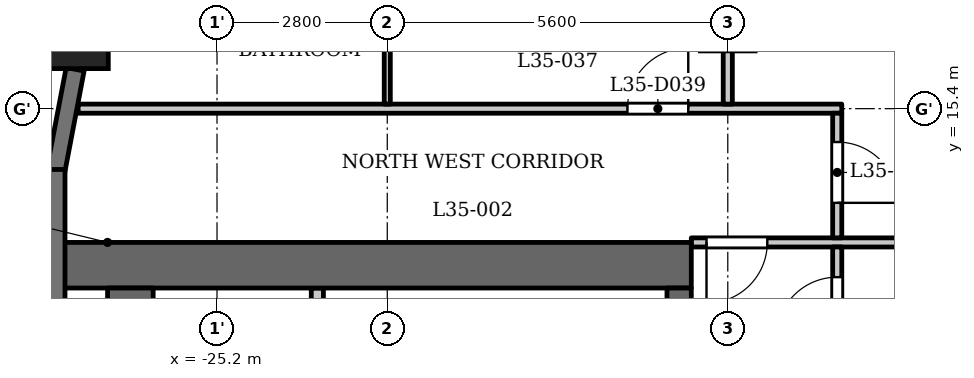
"""IFC4 building model, lengths in metres.
Left out: names, types, materials, properties, quantities, classifications, styles, units other than length and angle.
Written with IfcOpenShell. Run it as: python <this file> out.ifc"""

import sys

from ifc_helpers import new_model, si_unit, direction, frame, frame_2d, origin, origin_2d, place, context, subcontext, project, spatial, rectangle, extrude, element, fill, save


model = new_model("IFC4")
c1 = context("Model", 3, precision=1e-05, world=origin(), true_north=direction((0.0, 1.0)))
c2 = subcontext(c1, "Body", "Model", "MODEL_VIEW")
j1 = project(units=[si_unit("LENGTHUNIT", "METRE"), si_unit("PLANEANGLEUNIT", "RADIAN")], contexts=[c1])
p1 = place(None, origin())
s1 = spatial("IfcSite", under=j1, at=p1, CompositionType="ELEMENT")
p2 = place(p1, origin())
s2 = spatial("IfcBuilding", under=s1, at=p2, CompositionType="ELEMENT")
p3 = place(p2, frame((0.0, 0.0, 139.6)))
s3 = spatial("IfcBuildingStorey", under=s2, at=p3, CompositionType="ELEMENT", Elevation=139.6)
p4 = place(p3, frame((-27.538, 16.609, 0.0), z_axis=(0.0, 0.0, 1.0), x_axis=(1.0, 0.0, 0.0)))
e1 = element("IfcColumn", 1, at=p4, inside=s3, PredefinedType="COLUMN", context=c2, shape_type="SweptSolid", body=[
    extrude(rectangle(XDim=1.1, YDim=1.1, at=origin_2d()), origin(), (0.0, 0.0, 1.0), 3.5),
])
p5 = place(p3, frame((-27.533, 16.048, 0.0), z_axis=(0.0, 0.0, 1.0), x_axis=(-0.187302784601, -0.982302227871, 0.0)))
e2 = element("IfcWall", 2, at=p5, inside=s3, PredefinedType="SOLIDWALL", context=c2, shape_type="SweptSolid", body=[
    extrude(rectangle(XDim=1.706, YDim=0.3, at=frame_2d((0.853, 0.0))), origin(), (0.0, 0.0, 1.0), 2.45),
])
p6 = place(p3, frame((-27.85, 14.4, 0.0), z_axis=(0.0, 0.0, 1.0), x_axis=(0.0, -1.0, 0.0)))
e3 = element("IfcWall", 3, at=p6, inside=s3, PredefinedType="SOLIDWALL", context=c2, shape_type="SweptSolid", body=[
    extrude(rectangle(XDim=2.65, YDim=0.3, at=frame_2d((1.325, 0.0))), origin(), (0.0, 0.0, 1.0), 2.45),
])
p7 = place(p3, frame((-17.4, 12.825, 0.0), z_axis=(0.0, 0.0, 1.0), x_axis=(-1.0, 0.0, 0.0)))
e4 = element("IfcWall", 4, at=p7, inside=s3, PredefinedType="SHEAR", context=c2, shape_type="SweptSolid", body=[
    extrude(rectangle(XDim=10.4, YDim=0.75, at=frame_2d((5.2, 0.0))), origin(), (0.0, 0.0, 1.0), 3.2),
])
p8 = place(p3, frame((-17.6, -12.45, 0.0), z_axis=(0.0, 0.0, 1.0), x_axis=(0.0, 1.0, 0.0)))
e5 = element("IfcWall", 5, at=p8, inside=s3, PredefinedType="SHEAR", context=c2, shape_type="SweptSolid", body=[
    extrude(rectangle(XDim=24.9, YDim=0.4, at=frame_2d((12.45, 0.0))), origin(), (0.0, 0.0, 1.0), 3.2),
])
p9 = place(p8, frame((8.65, 0.0, 0.0)))
e6 = element("IfcOpeningElement", 6, at=p9, cuts=e5, PredefinedType="OPENING", context=c2, shape_type="SweptSolid", body=[
    extrude(rectangle(XDim=0.9, YDim=2.1, at=frame_2d((0.45, 1.05))), frame((0.0, 0.21, 0.0), z_axis=(0.0, -1.0, 0.0), x_axis=(1.0, 0.0, 0.0)), (0.0, 0.0, 1.0), 0.42),
])
p10 = place(p8, frame((15.6, 0.0, 0.0)))
e7 = element("IfcOpeningElement", 7, at=p10, cuts=e5, PredefinedType="OPENING", context=c2, shape_type="SweptSolid", body=[
    extrude(rectangle(XDim=1.1, YDim=2.1, at=frame_2d((0.55, 1.05))), frame((0.0, 0.21, 0.0), z_axis=(0.0, -1.0, 0.0), x_axis=(1.0, 0.0, 0.0)), (0.0, 0.0, 1.0), 0.42),
])
p11 = place(p8, frame((18.0, 0.0, 0.0)))
e8 = element("IfcOpeningElement", 8, at=p11, cuts=e5, PredefinedType="OPENING", context=c2, shape_type="SweptSolid", body=[
    extrude(rectangle(XDim=1.1, YDim=2.1, at=frame_2d((0.55, 1.05))), frame((0.0, 0.21, 0.0), z_axis=(0.0, -1.0, 0.0), x_axis=(1.0, 0.0, 0.0)), (0.0, 0.0, 1.0), 0.42),
])
p12 = place(p8, frame((23.025, 0.0, 0.0)))
e9 = element("IfcOpeningElement", 9, at=p12, cuts=e5, PredefinedType="OPENING", context=c2, shape_type="SweptSolid", body=[
    extrude(rectangle(XDim=1.1, YDim=2.1, at=frame_2d((0.55, 1.05))), frame((0.0, 0.21, 0.0), z_axis=(0.0, -1.0, 0.0), x_axis=(1.0, 0.0, 0.0)), (0.0, 0.0, 1.0), 0.42),
])
p13 = place(p8, frame((0.775, 0.0, 0.0)))
e10 = element("IfcOpeningElement", 10, at=p13, cuts=e5, PredefinedType="OPENING", context=c2, shape_type="SweptSolid", body=[
    extrude(rectangle(XDim=1.1, YDim=2.1, at=frame_2d((0.55, 1.05))), frame((0.0, 0.21, 0.0), z_axis=(0.0, -1.0, 0.0), x_axis=(1.0, 0.0, 0.0)), (0.0, 0.0, 1.0), 0.42),
])
p14 = place(p8, frame((12.925, 0.0, 0.0)))
e11 = element("IfcOpeningElement", 11, at=p14, cuts=e5, PredefinedType="OPENING", context=c2, shape_type="SweptSolid", body=[
    extrude(rectangle(XDim=1.8, YDim=2.1, at=frame_2d((0.9, 1.05))), frame((0.0, 0.21, 0.0), z_axis=(0.0, -1.0, 0.0), x_axis=(1.0, 0.0, 0.0)), (0.0, 0.0, 1.0), 0.42),
])
p15 = place(p3, frame((-26.625, -12.45, 0.0), z_axis=(0.0, 0.0, 1.0), x_axis=(0.0, 1.0, 0.0)))
e12 = element("IfcWall", 12, at=p15, inside=s3, PredefinedType="SHEAR", context=c2, shape_type="SweptSolid", body=[
    extrude(rectangle(XDim=24.9, YDim=0.75, at=frame_2d((12.45, 0.0))), origin(), (0.0, 0.0, 1.0), 3.2),
])
p16 = place(p3, frame((-23.55, 9.8, 0.0), z_axis=(0.0, 0.0, 1.0), x_axis=(0.0, 1.0, 0.0)))
e13 = element("IfcWall", 13, at=p16, inside=s3, PredefinedType="PARTITIONING", context=c2, shape_type="SweptSolid", body=[
    extrude(rectangle(XDim=2.65, YDim=0.2, at=frame_2d((1.325, 0.0))), origin(), (0.0, 0.0, 1.0), 3.2),
])
p17 = place(p16, frame((0.875, 0.0, 0.0)))
e14 = element("IfcOpeningElement", 14, at=p17, cuts=e13, PredefinedType="OPENING", context=c2, shape_type="SweptSolid", body=[
    extrude(rectangle(XDim=0.9, YDim=2.1, at=frame_2d((0.45, 1.05))), frame((0.0, 0.11, 0.0), z_axis=(0.0, -1.0, 0.0), x_axis=(1.0, 0.0, 0.0)), (0.0, 0.0, 1.0), 0.22),
])
p18 = place(p3, frame((-17.4, 13.2, 0.0), z_axis=(0.0, 0.0, 1.0), x_axis=(1.0, 0.0, 0.0)))
e15 = element("IfcWall", 15, at=p18, inside=s3, PredefinedType="PARTITIONING", context=c2, shape_type="SweptSolid", body=[
    extrude(rectangle(XDim=34.8, YDim=0.15, at=frame_2d((17.4, 0.0))), origin(), (0.0, 0.0, 1.0), 3.2),
])
p19 = place(p18, frame((0.25, 0.0, 0.0)))
e16 = element("IfcOpeningElement", 16, at=p19, cuts=e15, PredefinedType="OPENING", context=c2, shape_type="SweptSolid", body=[
    extrude(rectangle(XDim=1.0, YDim=2.1, at=frame_2d((0.5, 1.05))), frame((0.0, 0.085, 0.0), z_axis=(0.0, -1.0, 0.0), x_axis=(1.0, 0.0, 0.0)), (0.0, 0.0, 1.0), 0.17),
])
p20 = place(p18, frame((33.65, 0.0, 0.0)))
e17 = element("IfcOpeningElement", 17, at=p20, cuts=e15, PredefinedType="OPENING", context=c2, shape_type="SweptSolid", body=[
    extrude(rectangle(XDim=1.0, YDim=2.1, at=frame_2d((0.5, 1.05))), frame((0.0, 0.085, 0.0), z_axis=(0.0, -1.0, 0.0), x_axis=(1.0, 0.0, 0.0)), (0.0, 0.0, 1.0), 0.17),
])
p21 = place(p18, frame((15.75, 0.0, 0.0)))
e18 = element("IfcOpeningElement", 18, at=p21, cuts=e15, PredefinedType="OPENING", context=c2, shape_type="SweptSolid", body=[
    extrude(rectangle(XDim=1.0, YDim=2.1, at=frame_2d((0.5, 1.05))), frame((0.0, 0.085, 0.0), z_axis=(0.0, -1.0, 0.0), x_axis=(1.0, 0.0, 0.0)), (0.0, 0.0, 1.0), 0.17),
])
p22 = place(p18, frame((19.35, 0.0, 0.0)))
e19 = element("IfcOpeningElement", 19, at=p22, cuts=e15, PredefinedType="OPENING", context=c2, shape_type="SweptSolid", body=[
    extrude(rectangle(XDim=1.0, YDim=2.1, at=frame_2d((0.5, 1.05))), frame((0.0, 0.085, 0.0), z_axis=(0.0, -1.0, 0.0), x_axis=(1.0, 0.0, 0.0)), (0.0, 0.0, 1.0), 0.17),
])
p23 = place(p18, frame((26.95, 0.0, 0.0)))
e20 = element("IfcOpeningElement", 20, at=p23, cuts=e15, PredefinedType="OPENING", context=c2, shape_type="SweptSolid", body=[
    extrude(rectangle(XDim=1.0, YDim=2.1, at=frame_2d((0.5, 1.05))), frame((0.0, 0.085, 0.0), z_axis=(0.0, -1.0, 0.0), x_axis=(1.0, 0.0, 0.0)), (0.0, 0.0, 1.0), 0.17),
])
p24 = place(p18, frame((29.75, 0.0, 0.0)))
e21 = element("IfcOpeningElement", 21, at=p24, cuts=e15, PredefinedType="OPENING", context=c2, shape_type="SweptSolid", body=[
    extrude(rectangle(XDim=1.0, YDim=2.1, at=frame_2d((0.5, 1.05))), frame((0.0, 0.085, 0.0), z_axis=(0.0, -1.0, 0.0), x_axis=(1.0, 0.0, 0.0)), (0.0, 0.0, 1.0), 0.17),
])
p25 = place(p3, frame((-27.484, 15.4, 0.0), z_axis=(0.0, 0.0, 1.0), x_axis=(1.0, 0.0, 0.0)))
e22 = element("IfcWall", 22, at=p25, inside=s3, PredefinedType="PARTITIONING", context=c2, shape_type="SweptSolid", body=[
    extrude(rectangle(XDim=12.559, YDim=0.15, at=frame_2d((6.279, 0.0))), origin(), (0.0, 0.0, 1.0), 3.2),
])
p26 = place(p25, frame((9.034, 0.0, 0.0)))
e23 = element("IfcOpeningElement", 23, at=p26, cuts=e22, PredefinedType="OPENING", context=c2, shape_type="SweptSolid", body=[
    extrude(rectangle(XDim=1.0, YDim=2.1, at=frame_2d((0.5, 1.05))), frame((0.0, 0.085, 0.0), z_axis=(0.0, -1.0, 0.0), x_axis=(1.0, 0.0, 0.0)), (0.0, 0.0, 1.0), 0.17),
])
p27 = place(p3, frame((-22.4, 15.475, 0.0), z_axis=(0.0, 0.0, 1.0), x_axis=(0.0, 1.0, 0.0)))
e24 = element("IfcWall", 24, at=p27, inside=s3, PredefinedType="PARTITIONING", context=c2, shape_type="SweptSolid", body=[
    extrude(rectangle(XDim=2.575, YDim=0.1, at=frame_2d((1.288, 0.0))), origin(), (0.0, 0.0, 1.0), 3.2),
])
p28 = place(p3, frame((-16.8, 15.475, 0.0), z_axis=(0.0, 0.0, 1.0), x_axis=(0.0, 1.0, 0.0)))
e25 = element("IfcWall", 25, at=p28, inside=s3, PredefinedType="PARTITIONING", context=c2, shape_type="SweptSolid", body=[
    extrude(rectangle(XDim=7.455, YDim=0.15, at=frame_2d((3.728, 0.0))), origin(), (0.0, 0.0, 1.0), 3.2),
])
p29 = place(p3, frame((-15.0, 6.769, 0.0), z_axis=(0.0, 0.0, 1.0), x_axis=(0.0, 1.0, 0.0)))
e26 = element("IfcWall", 26, at=p29, inside=s3, PredefinedType="PARTITIONING", context=c2, shape_type="SweptSolid", body=[
    extrude(rectangle(XDim=6.356, YDim=0.15, at=frame_2d((3.178, 0.0))), origin(), (0.0, 0.0, 1.0), 3.2),
])
p30 = place(p29, frame((4.86, 0.0, 0.0)))
e27 = element("IfcOpeningElement", 27, at=p30, cuts=e26, PredefinedType="OPENING", context=c2, shape_type="SweptSolid", body=[
    extrude(rectangle(XDim=1.0, YDim=2.1, at=frame_2d((0.5, 1.05))), frame((0.0, 0.085, 0.0), z_axis=(0.0, -1.0, 0.0), x_axis=(1.0, 0.0, 0.0)), (0.0, 0.0, 1.0), 0.17),
])
p31 = place(p3, frame((-15.0, 13.275, 0.0), z_axis=(0.0, 0.0, 1.0), x_axis=(0.0, 1.0, 0.0)))
e28 = element("IfcWall", 28, at=p31, inside=s3, PredefinedType="PARTITIONING", context=c2, shape_type="SweptSolid", body=[
    extrude(rectangle(XDim=2.05, YDim=0.15, at=frame_2d((1.025, 0.0))), origin(), (0.0, 0.0, 1.0), 3.2),
])
p32 = place(p31, frame((0.576, 0.0, 0.0)))
e29 = element("IfcOpeningElement", 29, at=p32, cuts=e28, PredefinedType="OPENING", context=c2, shape_type="SweptSolid", body=[
    extrude(rectangle(XDim=1.0, YDim=2.1, at=frame_2d((0.5, 1.05))), frame((0.0, 0.085, 0.0), z_axis=(0.0, -1.0, 0.0), x_axis=(1.0, 0.0, 0.0)), (0.0, 0.0, 1.0), 0.17),
])
p33 = place(p30, origin())
e30 = element("IfcDoor", 30, at=p33, inside=s3, OperationType="SINGLE_SWING_RIGHT", PredefinedType="DOOR", context=c2, shape_type="SweptSolid", body=[
    extrude(rectangle(XDim=1.0, YDim=2.1, at=frame_2d((0.5, 1.05))), frame((0.0, 0.025, 0.0), z_axis=(0.0, -1.0, 0.0), x_axis=(1.0, 0.0, 0.0)), (0.0, 0.0, 1.0), 0.05),
])
fill(e27, e30)
p34 = place(p19, origin())
e31 = element("IfcDoor", 31, at=p34, inside=s3, OperationType="SINGLE_SWING_LEFT", PredefinedType="DOOR", context=c2, shape_type="SweptSolid", body=[
    extrude(rectangle(XDim=1.0, YDim=2.1, at=frame_2d((0.5, 1.05))), frame((0.0, 0.025, 0.0), z_axis=(0.0, -1.0, 0.0), x_axis=(1.0, 0.0, 0.0)), (0.0, 0.0, 1.0), 0.05),
])
fill(e16, e31)
p35 = place(p32, origin())
e32 = element("IfcDoor", 32, at=p35, inside=s3, OperationType="SINGLE_SWING_LEFT", PredefinedType="DOOR", context=c2, shape_type="SweptSolid", body=[
    extrude(rectangle(XDim=1.0, YDim=2.1, at=frame_2d((0.5, 1.05))), frame((0.0, 0.025, 0.0), z_axis=(0.0, -1.0, 0.0), x_axis=(1.0, 0.0, 0.0)), (0.0, 0.0, 1.0), 0.05),
])
fill(e29, e32)
p36 = place(p26, origin())
e33 = element("IfcDoor", 33, at=p36, inside=s3, OperationType="SINGLE_SWING_LEFT", PredefinedType="DOOR", context=c2, shape_type="SweptSolid", body=[
    extrude(rectangle(XDim=1.0, YDim=2.1, at=frame_2d((0.5, 1.05))), frame((0.0, 0.025, 0.0), z_axis=(0.0, -1.0, 0.0), x_axis=(1.0, 0.0, 0.0)), (0.0, 0.0, 1.0), 0.05),
])
fill(e23, e33)
save(model, sys.argv[1])
